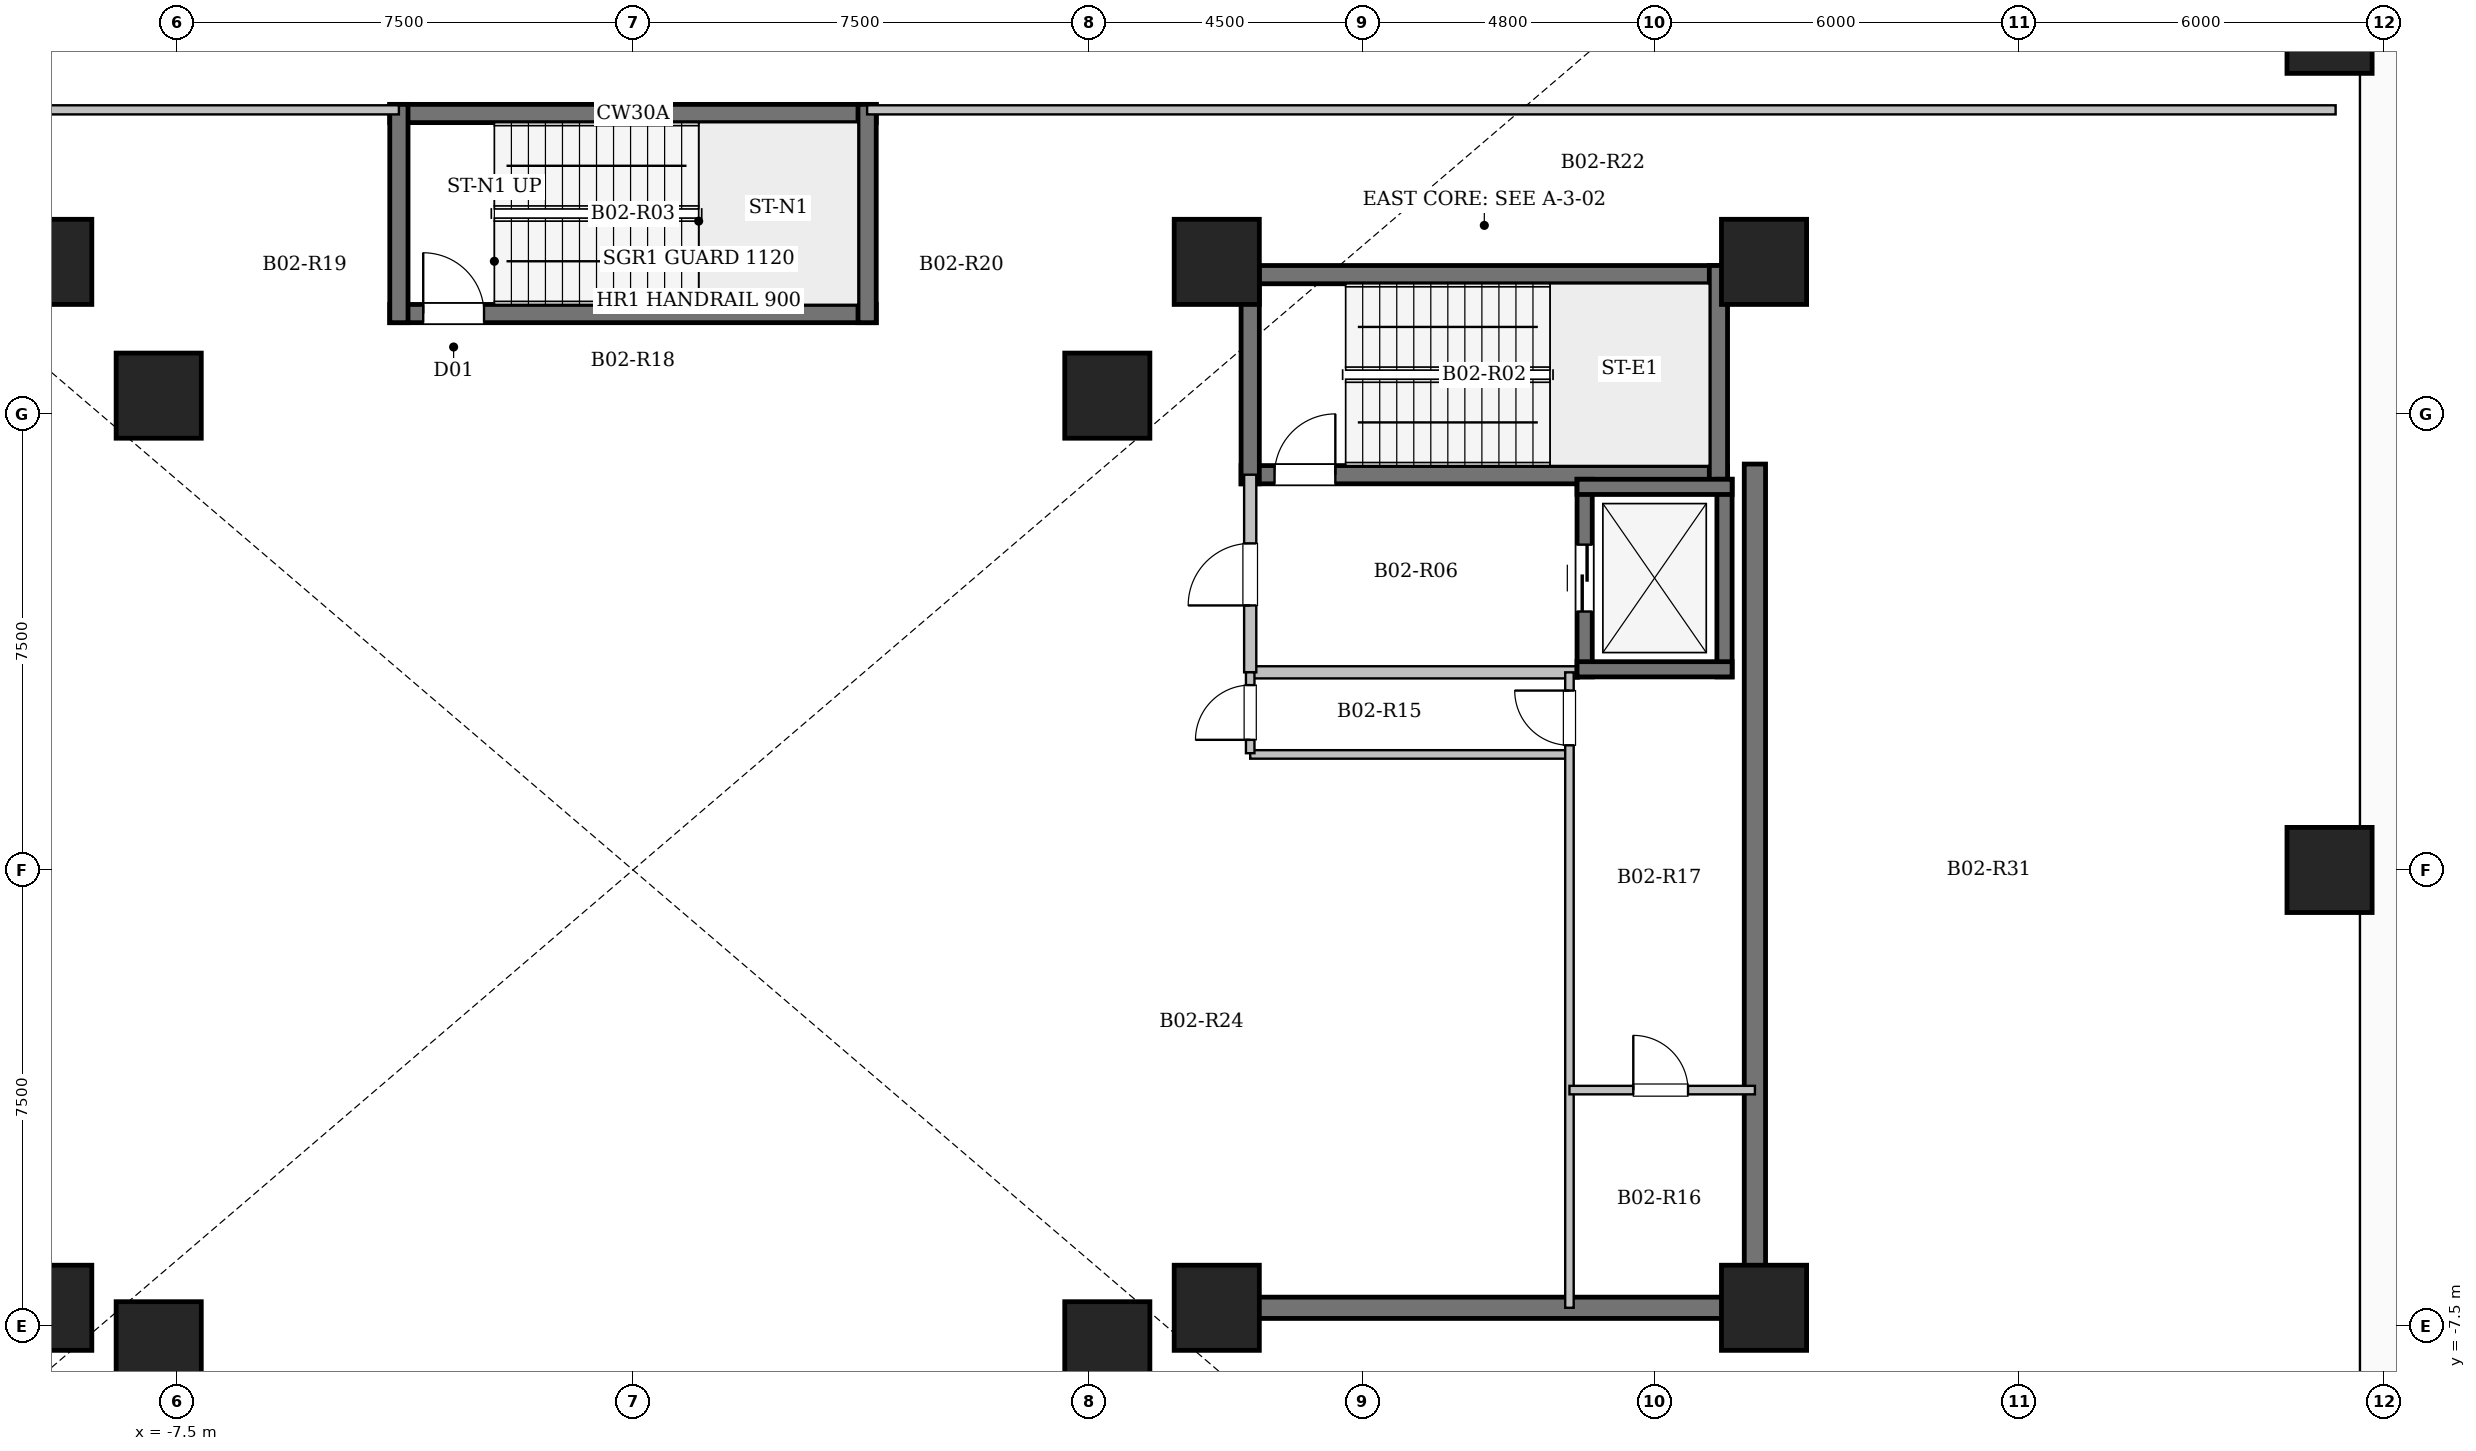
"""IFC4 building model, lengths in metres.
Left out: names, types, materials, properties, quantities, classifications, styles, units other than length and angle.
Written with IfcOpenShell. Run it as: python <this file> out.ifc"""

import sys

from ifc_helpers import new_model, si_unit, direction, frame, frame_2d, origin, origin_2d, place, context, subcontext, project, spatial, rectangle, extrude, element, fill, save


model = new_model("IFC4")
c1 = context("Model", 3, precision=1e-05, world=origin(), true_north=direction((0.0, 1.0)))
c2 = subcontext(c1, "Body", "Model", "MODEL_VIEW")
j1 = project(units=[si_unit("LENGTHUNIT", "METRE"), si_unit("PLANEANGLEUNIT", "RADIAN")], contexts=[c1])
p1 = place(None, origin())
s1 = spatial("IfcSite", under=j1, at=p1, CompositionType="ELEMENT")
p2 = place(p1, origin())
s2 = spatial("IfcBuilding", under=s1, at=p2, CompositionType="ELEMENT")
p3 = place(p2, frame((0.0, 0.0, -9.2)))
s3 = spatial("IfcBuildingStorey", under=s2, at=p3, CompositionType="ELEMENT", Elevation=-9.2)
for number, where, z_axis, x_axis in (
    (1, (-7.8, -7.8, 0.0), (0.0, 0.0, 1.0), (1.0, 0.0, 0.0)),
    (2, (7.8, -7.8, 0.0), (0.0, 0.0, 1.0), (1.0, 0.0, 0.0)),
    (3, (-7.8, 7.8, 0.0), (0.0, 0.0, 1.0), (1.0, 0.0, 0.0)),
    (4, (7.8, 7.8, 0.0), (0.0, 0.0, 1.0), (1.0, 0.0, 0.0)),
    (5, (-9.6, -7.2, 0.0), (0.0, 0.0, 1.0), (1.0, 0.0, 0.0)),
    (6, (-9.6, 10.0, 0.0), (0.0, 0.0, 1.0), (1.0, 0.0, 0.0)),
    (7, (9.6, -7.2, 0.0), (0.0, 0.0, 1.0), (1.0, 0.0, 0.0)),
    (8, (9.6, 10.0, 0.0), (0.0, 0.0, 1.0), (1.0, 0.0, 0.0)),
    (9, (18.6, -7.2, 0.0), (0.0, 0.0, 1.0), (1.0, 0.0, 0.0)),
    (10, (18.6, 10.0, 0.0), (0.0, 0.0, 1.0), (1.0, 0.0, 0.0)),
    (11, (27.9, 0.0, 0.0), (0.0, 0.0, 1.0), (1.0, 0.0, 0.0)),
    (12, (27.9, 13.8, 0.0), (0.0, 0.0, 1.0), (1.0, 0.0, 0.0)),
):
    element("IfcColumn", number, at=place(p3, frame(where, z_axis=z_axis, x_axis=x_axis)), inside=s3, PredefinedType="COLUMN", context=c2, shape_type="SweptSolid", body=[
        extrude(rectangle(XDim=1.4, YDim=1.4, at=origin_2d()), origin(), (0.0, 0.0, 1.0), 4.6),
    ])
p4 = place(p3, frame((10.0, 9.79, 0.0), z_axis=(0.0, 0.0, 1.0), x_axis=(1.0, 0.0, 0.0)))
e13 = element("IfcWall", 13, at=p4, inside=s3, PredefinedType="SHEAR", context=c2, shape_type="SweptSolid", body=[
    extrude(rectangle(XDim=8.0, YDim=0.3, at=frame_2d((4.0, 0.0))), origin(), (0.0, 0.0, 1.0), 4.6),
])
p5 = place(p3, frame((10.0, 6.5, 0.0), z_axis=(0.0, 0.0, 1.0), x_axis=(1.0, 0.0, 0.0)))
e14 = element("IfcWall", 14, at=p5, inside=s3, PredefinedType="SHEAR", context=c2, shape_type="SweptSolid", body=[
    extrude(rectangle(XDim=8.0, YDim=0.3, at=frame_2d((4.0, 0.0))), origin(), (0.0, 0.0, 1.0), 4.6),
])
p6 = place(p5, frame((0.55, 0.0, 0.0)))
e15 = element("IfcOpeningElement", 15, at=p6, cuts=e14, PredefinedType="OPENING", context=c2, shape_type="SweptSolid", body=[
    extrude(rectangle(XDim=1.0, YDim=2.15, at=frame_2d((0.5, 1.075))), frame((0.0, 0.16, 0.0), z_axis=(0.0, -1.0, 0.0), x_axis=(1.0, 0.0, 0.0)), (0.0, 0.0, 1.0), 0.32),
])
for number, where, z_axis, x_axis in (
    (16, (10.15, 6.35, 0.0), (0.0, 0.0, 1.0), (0.0, 1.0, 0.0)),
    (17, (17.85, 6.35, 0.0), (0.0, 0.0, 1.0), (0.0, 1.0, 0.0)),
):
    element("IfcWall", number, at=place(p3, frame(where, z_axis=z_axis, x_axis=x_axis)), inside=s3, PredefinedType="SHEAR", context=c2, shape_type="SweptSolid", body=[
        extrude(rectangle(XDim=3.59, YDim=0.3, at=frame_2d((1.795, 0.0))), origin(), (0.0, 0.0, 1.0), 4.6),
    ])
p7 = place(p3, frame((-4.0, 12.44, 0.0), z_axis=(0.0, 0.0, 1.0), x_axis=(1.0, 0.0, 0.0)))
e18 = element("IfcWall", 18, at=p7, inside=s3, PredefinedType="SHEAR", context=c2, shape_type="SweptSolid", body=[
    extrude(rectangle(XDim=8.0, YDim=0.3, at=frame_2d((4.0, 0.0))), origin(), (0.0, 0.0, 1.0), 4.6),
])
p8 = place(p3, frame((-4.0, 9.15, 0.0), z_axis=(0.0, 0.0, 1.0), x_axis=(1.0, 0.0, 0.0)))
e19 = element("IfcWall", 19, at=p8, inside=s3, PredefinedType="SHEAR", context=c2, shape_type="SweptSolid", body=[
    extrude(rectangle(XDim=8.0, YDim=0.3, at=frame_2d((4.0, 0.0))), origin(), (0.0, 0.0, 1.0), 4.6),
])
p9 = place(p8, frame((0.55, 0.0, 0.0)))
e20 = element("IfcOpeningElement", 20, at=p9, cuts=e19, PredefinedType="OPENING", context=c2, shape_type="SweptSolid", body=[
    extrude(rectangle(XDim=1.0, YDim=2.15, at=frame_2d((0.5, 1.075))), frame((0.0, 0.16, 0.0), z_axis=(0.0, -1.0, 0.0), x_axis=(1.0, 0.0, 0.0)), (0.0, 0.0, 1.0), 0.32),
])
for number, where, z_axis, x_axis in (
    (21, (-3.85, 9.0, 0.0), (0.0, 0.0, 1.0), (0.0, 1.0, 0.0)),
    (22, (3.85, 9.0, 0.0), (0.0, 0.0, 1.0), (0.0, 1.0, 0.0)),
):
    element("IfcWall", number, at=place(p3, frame(where, z_axis=z_axis, x_axis=x_axis)), inside=s3, PredefinedType="SHEAR", context=c2, shape_type="SweptSolid", body=[
        extrude(rectangle(XDim=3.59, YDim=0.3, at=frame_2d((1.795, 0.0))), origin(), (0.0, 0.0, 1.0), 4.6),
    ])
p10 = place(p3, frame((10.15, 3.25, 0.0), z_axis=(0.0, 0.0, 1.0), x_axis=(1.0, 0.0, 0.0)))
e23 = element("IfcWall", 23, at=p10, inside=s3, PredefinedType="SOLIDWALL", context=c2, shape_type="SweptSolid", body=[
    extrude(rectangle(XDim=5.4, YDim=0.2, at=frame_2d((2.7, 0.0))), origin(), (0.0, 0.0, 1.0), 4.3),
])
p11 = place(p3, frame((10.15, 3.25, 0.0), z_axis=(0.0, 0.0, 1.0), x_axis=(0.0, 1.0, 0.0)))
e24 = element("IfcWall", 24, at=p11, inside=s3, PredefinedType="SOLIDWALL", context=c2, shape_type="SweptSolid", body=[
    extrude(rectangle(XDim=3.25, YDim=0.2, at=frame_2d((1.625, 0.0))), origin(), (0.0, 0.0, 1.0), 4.3),
])
p12 = place(p11, frame((1.1, 0.0, 0.0)))
e25 = element("IfcOpeningElement", 25, at=p12, cuts=e24, PredefinedType="OPENING", context=c2, shape_type="SweptSolid", body=[
    extrude(rectangle(XDim=1.02, YDim=2.15, at=frame_2d((0.51, 1.075))), frame((0.0, 0.11, 0.0), z_axis=(0.0, -1.0, 0.0), x_axis=(1.0, 0.0, 0.0)), (0.0, 0.0, 1.0), 0.22),
])
p13 = place(p3, frame((15.65, 3.175, 0.0), z_axis=(0.0, 0.0, 1.0), x_axis=(0.0, 1.0, 0.0)))
e26 = element("IfcWall", 26, at=p13, inside=s3, PredefinedType="SHEAR", context=c2, shape_type="SweptSolid", body=[
    extrude(rectangle(XDim=3.25, YDim=0.25, at=frame_2d((1.625, 0.0))), origin(), (0.0, 0.0, 1.0), 4.6),
])
p14 = place(p13, frame((1.075, 0.0, 0.0)))
e27 = element("IfcOpeningElement", 27, at=p14, cuts=e26, PredefinedType="OPENING", context=c2, shape_type="SweptSolid", body=[
    extrude(rectangle(XDim=1.1, YDim=2.15, at=frame_2d((0.55, 1.075))), frame((0.0, 0.135, 0.0), z_axis=(0.0, -1.0, 0.0), x_axis=(1.0, 0.0, 0.0)), (0.0, 0.0, 1.0), 0.27),
])
p15 = place(p3, frame((17.95, 3.175, 0.0), z_axis=(0.0, 0.0, 1.0), x_axis=(0.0, 1.0, 0.0)))
e28 = element("IfcWall", 28, at=p15, inside=s3, PredefinedType="SHEAR", context=c2, shape_type="SweptSolid", body=[
    extrude(rectangle(XDim=3.25, YDim=0.25, at=frame_2d((1.625, 0.0))), origin(), (0.0, 0.0, 1.0), 4.6),
])
for number, where, z_axis, x_axis in (
    (29, (15.525, 3.3, 0.0), (0.0, 0.0, 1.0), (1.0, 0.0, 0.0)),
    (30, (15.525, 6.3, 0.0), (0.0, 0.0, 1.0), (1.0, 0.0, 0.0)),
):
    element("IfcWall", number, at=place(p3, frame(where, z_axis=z_axis, x_axis=x_axis)), inside=s3, PredefinedType="SHEAR", context=c2, shape_type="SweptSolid", body=[
        extrude(rectangle(XDim=2.55, YDim=0.25, at=frame_2d((1.275, 0.0))), origin(), (0.0, 0.0, 1.0), 4.6),
    ])
p16 = place(p3, frame((18.45, -7.375, 0.0), z_axis=(0.0, 0.0, 1.0), x_axis=(0.0, 1.0, 0.0)))
e31 = element("IfcWall", 31, at=p16, inside=s3, PredefinedType="SHEAR", context=c2, shape_type="SweptSolid", body=[
    extrude(rectangle(XDim=14.05, YDim=0.35, at=frame_2d((7.025, 0.0))), origin(), (0.0, 0.0, 1.0), 4.6),
])
p17 = place(p3, frame((10.075, -7.2, 0.0), z_axis=(0.0, 0.0, 1.0), x_axis=(1.0, 0.0, 0.0)))
e32 = element("IfcWall", 32, at=p17, inside=s3, PredefinedType="SHEAR", context=c2, shape_type="SweptSolid", body=[
    extrude(rectangle(XDim=8.55, YDim=0.35, at=frame_2d((4.275, 0.0))), origin(), (0.0, 0.0, 1.0), 4.6),
])
p18 = place(p3, frame((10.15, 1.9, 0.0), z_axis=(0.0, 0.0, 1.0), x_axis=(1.0, 0.0, 0.0)))
e33 = element("IfcWall", 33, at=p18, inside=s3, PredefinedType="PARTITIONING", context=c2, shape_type="SweptSolid", body=[
    extrude(rectangle(XDim=5.25, YDim=0.14, at=frame_2d((2.625, 0.0))), origin(), (0.0, 0.0, 1.0), 4.3),
])
p19 = place(p3, frame((10.15, 1.92, 0.0), z_axis=(0.0, 0.0, 1.0), x_axis=(0.0, 1.0, 0.0)))
e34 = element("IfcWall", 34, at=p19, inside=s3, PredefinedType="PARTITIONING", context=c2, shape_type="SweptSolid", body=[
    extrude(rectangle(XDim=1.33, YDim=0.14, at=frame_2d((0.665, 0.0))), origin(), (0.0, 0.0, 1.0), 4.3),
])
p20 = place(p19, frame((0.22, 0.0, 0.0)))
e35 = element("IfcOpeningElement", 35, at=p20, cuts=e34, PredefinedType="OPENING", context=c2, shape_type="SweptSolid", body=[
    extrude(rectangle(XDim=0.9, YDim=2.08, at=frame_2d((0.45, 1.04))), frame((0.0, 0.08, 0.0), z_axis=(0.0, -1.0, 0.0), x_axis=(1.0, 0.0, 0.0)), (0.0, 0.0, 1.0), 0.16),
])
p21 = place(p3, frame((15.4, -7.2, 0.0), z_axis=(0.0, 0.0, 1.0), x_axis=(0.0, 1.0, 0.0)))
e36 = element("IfcWall", 36, at=p21, inside=s3, PredefinedType="PARTITIONING", context=c2, shape_type="SweptSolid", body=[
    extrude(rectangle(XDim=10.45, YDim=0.14, at=frame_2d((5.225, 0.0))), origin(), (0.0, 0.0, 1.0), 4.3),
])
p22 = place(p21, frame((9.25, 0.0, 0.0)))
e37 = element("IfcOpeningElement", 37, at=p22, cuts=e36, PredefinedType="OPENING", context=c2, shape_type="SweptSolid", body=[
    extrude(rectangle(XDim=0.9, YDim=2.08, at=frame_2d((0.45, 1.04))), frame((0.0, 0.08, 0.0), z_axis=(0.0, -1.0, 0.0), x_axis=(1.0, 0.0, 0.0)), (0.0, 0.0, 1.0), 0.16),
])
p23 = place(p3, frame((15.4, -3.62, 0.0), z_axis=(0.0, 0.0, 1.0), x_axis=(1.0, 0.0, 0.0)))
e38 = element("IfcWall", 38, at=p23, inside=s3, PredefinedType="PARTITIONING", context=c2, shape_type="SweptSolid", body=[
    extrude(rectangle(XDim=3.05, YDim=0.14, at=frame_2d((1.525, 0.0))), origin(), (0.0, 0.0, 1.0), 4.3),
])
p24 = place(p23, frame((1.05, 0.0, 0.0)))
e39 = element("IfcOpeningElement", 39, at=p24, cuts=e38, PredefinedType="OPENING", context=c2, shape_type="SweptSolid", body=[
    extrude(rectangle(XDim=0.9, YDim=2.08, at=frame_2d((0.45, 1.04))), frame((0.0, 0.08, 0.0), z_axis=(0.0, -1.0, 0.0), x_axis=(1.0, 0.0, 0.0)), (0.0, 0.0, 1.0), 0.16),
])
for number, where, z_axis, x_axis in (
    (40, (-28.0, 12.5, 0.0), (0.0, 0.0, 1.0), (1.0, 0.0, 0.0)),
    (41, (3.85, 12.5, 0.0), (0.0, 0.0, 1.0), (1.0, 0.0, 0.0)),
):
    element("IfcWall", number, at=place(p3, frame(where, z_axis=z_axis, x_axis=x_axis)), inside=s3, PredefinedType="PARTITIONING", context=c2, shape_type="SweptSolid", body=[
        extrude(rectangle(XDim=24.15, YDim=0.15, at=frame_2d((12.075, 0.0))), origin(), (0.0, 0.0, 1.0), 4.3),
    ])
p25 = place(p6, origin())
e42 = element("IfcDoor", 42, at=p25, inside=s3, OperationType="SINGLE_SWING_RIGHT", PredefinedType="DOOR", context=c2, shape_type="SweptSolid", body=[
    extrude(rectangle(XDim=1.0, YDim=2.15, at=frame_2d((0.5, 1.075))), frame((0.0, 0.025, 0.0), z_axis=(0.0, -1.0, 0.0), x_axis=(1.0, 0.0, 0.0)), (0.0, 0.0, 1.0), 0.05),
])
fill(e15, e42)
p26 = place(p9, origin())
e43 = element("IfcDoor", 43, at=p26, inside=s3, OperationType="SINGLE_SWING_LEFT", PredefinedType="DOOR", context=c2, shape_type="SweptSolid", body=[
    extrude(rectangle(XDim=1.0, YDim=2.15, at=frame_2d((0.5, 1.075))), frame((0.0, 0.025, 0.0), z_axis=(0.0, -1.0, 0.0), x_axis=(1.0, 0.0, 0.0)), (0.0, 0.0, 1.0), 0.05),
])
fill(e20, e43)
p27 = place(p12, origin())
e44 = element("IfcDoor", 44, at=p27, inside=s3, OperationType="SINGLE_SWING_LEFT", PredefinedType="DOOR", context=c2, shape_type="SweptSolid", body=[
    extrude(rectangle(XDim=1.02, YDim=2.15, at=frame_2d((0.51, 1.075))), frame((0.0, 0.025, 0.0), z_axis=(0.0, -1.0, 0.0), x_axis=(1.0, 0.0, 0.0)), (0.0, 0.0, 1.0), 0.05),
])
fill(e25, e44)
p28 = place(p14, origin())
e45 = element("IfcDoor", 45, at=p28, inside=s3, OperationType="SLIDING_TO_LEFT", PredefinedType="DOOR", context=c2, shape_type="SweptSolid", body=[
    extrude(rectangle(XDim=1.1, YDim=2.15, at=frame_2d((0.55, 1.075))), frame((0.0, 0.025, 0.0), z_axis=(0.0, -1.0, 0.0), x_axis=(1.0, 0.0, 0.0)), (0.0, 0.0, 1.0), 0.05),
])
fill(e27, e45)
p29 = place(p20, origin())
e46 = element("IfcDoor", 46, at=p29, inside=s3, OperationType="SINGLE_SWING_LEFT", PredefinedType="DOOR", context=c2, shape_type="SweptSolid", body=[
    extrude(rectangle(XDim=0.9, YDim=2.08, at=frame_2d((0.45, 1.04))), frame((0.0, 0.025, 0.0), z_axis=(0.0, -1.0, 0.0), x_axis=(1.0, 0.0, 0.0)), (0.0, 0.0, 1.0), 0.05),
])
fill(e35, e46)
p30 = place(p22, origin())
e47 = element("IfcDoor", 47, at=p30, inside=s3, OperationType="SINGLE_SWING_RIGHT", PredefinedType="DOOR", context=c2, shape_type="SweptSolid", body=[
    extrude(rectangle(XDim=0.9, YDim=2.08, at=frame_2d((0.45, 1.04))), frame((0.0, 0.025, 0.0), z_axis=(0.0, -1.0, 0.0), x_axis=(1.0, 0.0, 0.0)), (0.0, 0.0, 1.0), 0.05),
])
fill(e37, e47)
p31 = place(p24, origin())
e48 = element("IfcDoor", 48, at=p31, inside=s3, OperationType="SINGLE_SWING_LEFT", PredefinedType="DOOR", context=c2, shape_type="SweptSolid", body=[
    extrude(rectangle(XDim=0.9, YDim=2.08, at=frame_2d((0.45, 1.04))), frame((0.0, 0.025, 0.0), z_axis=(0.0, -1.0, 0.0), x_axis=(1.0, 0.0, 0.0)), (0.0, 0.0, 1.0), 0.05),
])
fill(e39, e48)
save(model, sys.argv[1])
